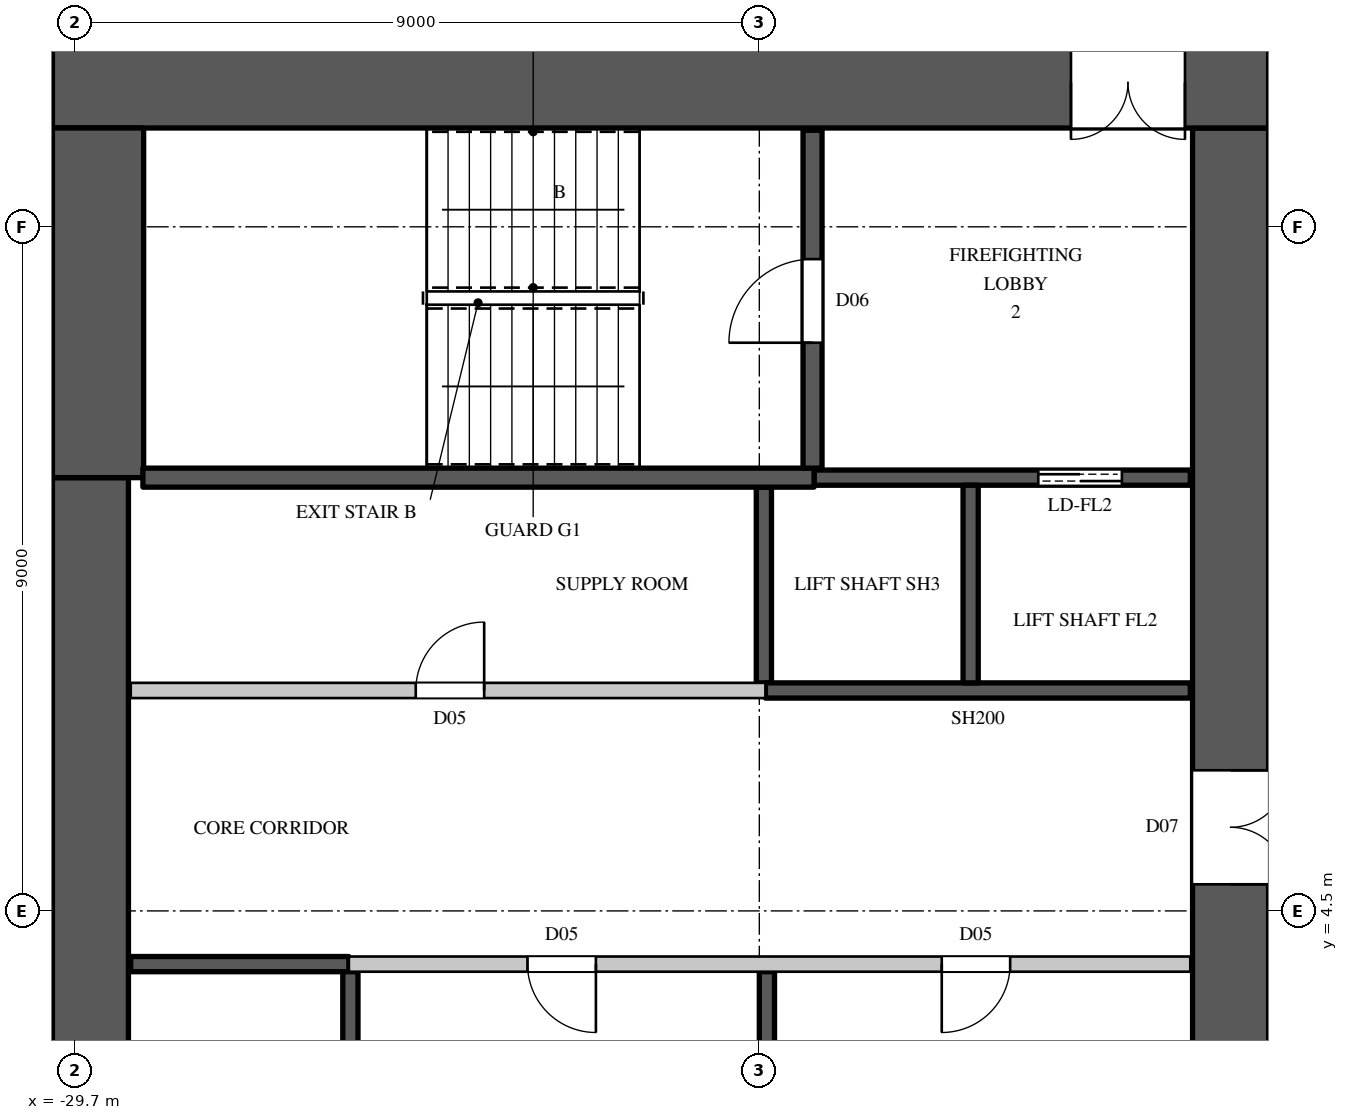
"""IFC4 building model, lengths in metres.
Left out: names, types, materials, properties, quantities, classifications, styles, units other than length and angle.
Written with IfcOpenShell. Run it as: python <this file> out.ifc"""

import sys

from ifc_helpers import new_model, si_unit, direction, frame, frame_2d, origin, place, context, subcontext, project, spatial, rectangle, extrude, element, fill, save


model = new_model("IFC4")
c1 = context("Model", 3, precision=1e-05, world=origin(), true_north=direction((0.0, 1.0)))
c2 = subcontext(c1, "Body", "Model", "MODEL_VIEW")
j1 = project(units=[si_unit("LENGTHUNIT", "METRE"), si_unit("PLANEANGLEUNIT", "RADIAN")], contexts=[c1])
p1 = place(None, origin())
s1 = spatial("IfcSite", under=j1, at=p1, CompositionType="ELEMENT")
p2 = place(p1, origin())
s2 = spatial("IfcBuilding", under=s1, at=p2, CompositionType="ELEMENT")
p3 = place(p2, frame((0.0, 0.0, 141.9)))
s3 = spatial("IfcBuildingStorey", under=s2, at=p3, CompositionType="ELEMENT", Elevation=141.9)
p4 = place(p3, frame((-30.0, 15.4, 0.0), z_axis=(0.0, 0.0, 1.0), x_axis=(1.0, 0.0, 0.0)))
e1 = element("IfcWall", 1, at=p4, inside=s3, PredefinedType="SHEAR", context=c2, shape_type="SweptSolid", body=[
    extrude(rectangle(XDim=16.0, YDim=1.2, at=frame_2d((8.0, 0.0))), origin(), (0.0, 0.0, 1.0), 3.6),
])
p5 = place(p4, frame((13.4, 0.0, 0.0)))
e2 = element("IfcOpeningElement", 2, at=p5, cuts=e1, PredefinedType="OPENING", context=c2, shape_type="SweptSolid", body=[
    extrude(rectangle(XDim=1.5, YDim=2.4, at=frame_2d((0.75, 1.2))), frame((0.0, 0.61, 0.0), z_axis=(0.0, -1.0, 0.0), x_axis=(1.0, 0.0, 0.0)), (0.0, 0.0, 1.0), 1.22),
])
p6 = place(p3, frame((-14.5, -14.8, 0.0), z_axis=(0.0, 0.0, 1.0), x_axis=(0.0, 1.0, 0.0)))
e3 = element("IfcWall", 3, at=p6, inside=s3, PredefinedType="SHEAR", context=c2, shape_type="SweptSolid", body=[
    extrude(rectangle(XDim=29.6, YDim=1.0, at=frame_2d((14.8, 0.0))), origin(), (0.0, 0.0, 1.0), 3.6),
])
p7 = place(p6, frame((8.45, 0.0, 0.0)))
e4 = element("IfcOpeningElement", 4, at=p7, cuts=e3, PredefinedType="OPENING", context=c2, shape_type="SweptSolid", body=[
    extrude(rectangle(XDim=1.5, YDim=2.4, at=frame_2d((0.75, 1.2))), frame((0.0, 0.51, 0.0), z_axis=(0.0, -1.0, 0.0), x_axis=(1.0, 0.0, 0.0)), (0.0, 0.0, 1.0), 1.02),
])
p8 = place(p6, frame((19.65, 0.0, 0.0)))
e5 = element("IfcOpeningElement", 5, at=p8, cuts=e3, PredefinedType="OPENING", context=c2, shape_type="SweptSolid", body=[
    extrude(rectangle(XDim=1.5, YDim=2.4, at=frame_2d((0.75, 1.2))), frame((0.0, 0.51, 0.0), z_axis=(0.0, -1.0, 0.0), x_axis=(1.0, 0.0, 0.0)), (0.0, 0.0, 1.0), 1.02),
])
p9 = place(p6, frame((14.5, 0.0, 0.0)))
e6 = element("IfcOpeningElement", 6, at=p9, cuts=e3, PredefinedType="OPENING", context=c2, shape_type="SweptSolid", body=[
    extrude(rectangle(XDim=0.6, YDim=2.0, at=frame_2d((0.3, 1.0))), frame((0.0, 0.51, 0.0), z_axis=(0.0, -1.0, 0.0), x_axis=(1.0, 0.0, 0.0)), (0.0, 0.0, 1.0), 1.02),
])
p10 = place(p3, frame((-29.5, -10.2, 0.0), z_axis=(0.0, 0.0, 1.0), x_axis=(0.0, 1.0, 0.0)))
e7 = element("IfcWall", 7, at=p10, inside=s3, PredefinedType="SHEAR", context=c2, shape_type="SweptSolid", body=[
    extrude(rectangle(XDim=20.4, YDim=1.0, at=frame_2d((10.2, 0.0))), origin(), (0.0, 0.0, 1.0), 3.6),
])
p11 = place(p3, frame((-29.4, 10.2, 0.0), z_axis=(0.0, 0.0, 1.0), x_axis=(0.0, 1.0, 0.0)))
e8 = element("IfcWall", 8, at=p11, inside=s3, PredefinedType="SHEAR", context=c2, shape_type="SweptSolid", body=[
    extrude(rectangle(XDim=4.6, YDim=1.2, at=frame_2d((2.3, 0.0))), origin(), (0.0, 0.0, 1.0), 3.6),
])
p12 = place(p3, frame((-28.97, 7.4, 0.0), z_axis=(0.0, 0.0, 1.0), x_axis=(1.0, 0.0, 0.0)))
e9 = element("IfcWall", 9, at=p12, inside=s3, PredefinedType="PARTITIONING", context=c2, shape_type="SweptSolid", body=[
    extrude(rectangle(XDim=8.35, YDim=0.2, at=frame_2d((4.175, 0.0))), origin(), (0.0, 0.0, 1.0), 3.3),
])
p13 = place(p12, frame((3.75, 0.0, 0.0)))
e10 = element("IfcOpeningElement", 10, at=p13, cuts=e9, PredefinedType="OPENING", context=c2, shape_type="SweptSolid", body=[
    extrude(rectangle(XDim=0.9, YDim=2.2, at=frame_2d((0.45, 1.1))), frame((0.0, 0.11, 0.0), z_axis=(0.0, -1.0, 0.0), x_axis=(1.0, 0.0, 0.0)), (0.0, 0.0, 1.0), 0.22),
])
p14 = place(p3, frame((-26.1, 3.8, 0.0), z_axis=(0.0, 0.0, 1.0), x_axis=(1.0, 0.0, 0.0)))
e11 = element("IfcWall", 11, at=p14, inside=s3, PredefinedType="PARTITIONING", context=c2, shape_type="SweptSolid", body=[
    extrude(rectangle(XDim=11.07, YDim=0.2, at=frame_2d((5.535, 0.0))), origin(), (0.0, 0.0, 1.0), 3.3),
])
p15 = place(p14, frame((2.35, 0.0, 0.0)))
e12 = element("IfcOpeningElement", 12, at=p15, cuts=e11, PredefinedType="OPENING", context=c2, shape_type="SweptSolid", body=[
    extrude(rectangle(XDim=0.9, YDim=2.2, at=frame_2d((0.45, 1.1))), frame((0.0, 0.11, 0.0), z_axis=(0.0, -1.0, 0.0), x_axis=(1.0, 0.0, 0.0)), (0.0, 0.0, 1.0), 0.22),
])
p16 = place(p14, frame((7.8, 0.0, 0.0)))
e13 = element("IfcOpeningElement", 13, at=p16, cuts=e11, PredefinedType="OPENING", context=c2, shape_type="SweptSolid", body=[
    extrude(rectangle(XDim=0.9, YDim=2.2, at=frame_2d((0.45, 1.1))), frame((0.0, 0.11, 0.0), z_axis=(0.0, -1.0, 0.0), x_axis=(1.0, 0.0, 0.0)), (0.0, 0.0, 1.0), 0.22),
])
p17 = place(p3, frame((-20.6, 1.1, 0.0), z_axis=(0.0, 0.0, 1.0), x_axis=(0.0, 1.0, 0.0)))
e14 = element("IfcWall", 14, at=p17, inside=s3, PredefinedType="SHEAR", context=c2, shape_type="SweptSolid", body=[
    extrude(rectangle(XDim=2.6, YDim=0.2, at=frame_2d((1.3, 0.0))), origin(), (0.0, 0.0, 1.0), 2.15),
])
p18 = place(p3, frame((-28.97, 3.8, 0.0), z_axis=(0.0, 0.0, 1.0), x_axis=(1.0, 0.0, 0.0)))
e15 = element("IfcWall", 15, at=p18, inside=s3, PredefinedType="SHEAR", context=c2, shape_type="SweptSolid", body=[
    extrude(rectangle(XDim=2.87, YDim=0.2, at=frame_2d((1.435, 0.0))), origin(), (0.0, 0.0, 1.0), 3.3),
])
p19 = place(p3, frame((-26.08, 1.1, 0.0), z_axis=(0.0, 0.0, 1.0), x_axis=(0.0, 1.0, 0.0)))
e16 = element("IfcWall", 16, at=p19, inside=s3, PredefinedType="SHEAR", context=c2, shape_type="SweptSolid", body=[
    extrude(rectangle(XDim=2.6, YDim=0.2, at=frame_2d((1.3, 0.0))), origin(), (0.0, 0.0, 1.0), 3.6),
])
p20 = place(p3, frame((-20.64, 7.5, 0.0), z_axis=(0.0, 0.0, 1.0), x_axis=(0.0, 1.0, 0.0)))
e17 = element("IfcWall", 17, at=p20, inside=s3, PredefinedType="SHEAR", context=c2, shape_type="SweptSolid", body=[
    extrude(rectangle(XDim=2.575, YDim=0.2, at=frame_2d((1.288, 0.0))), origin(), (0.0, 0.0, 1.0), 3.6),
])
p21 = place(p3, frame((-20.62, 7.4, 0.0), z_axis=(0.0, 0.0, 1.0), x_axis=(1.0, 0.0, 0.0)))
e18 = element("IfcWall", 18, at=p21, inside=s3, PredefinedType="SHEAR", context=c2, shape_type="SweptSolid", body=[
    extrude(rectangle(XDim=5.59, YDim=0.2, at=frame_2d((2.795, 0.0))), origin(), (0.0, 0.0, 1.0), 3.3),
])
p22 = place(p3, frame((-19.98, 10.2, 0.0), z_axis=(0.0, 0.0, 1.0), x_axis=(1.0, 0.0, 0.0)))
e19 = element("IfcWall", 19, at=p22, inside=s3, PredefinedType="SHEAR", context=c2, shape_type="SweptSolid", body=[
    extrude(rectangle(XDim=4.95, YDim=0.2, at=frame_2d((2.475, 0.0))), origin(), (0.0, 0.0, 1.0), 3.3),
])
p23 = place(p22, frame((2.95, 0.0, 0.0)))
e20 = element("IfcOpeningElement", 20, at=p23, cuts=e19, PredefinedType="OPENING", context=c2, shape_type="SweptSolid", body=[
    extrude(rectangle(XDim=1.1, YDim=2.2, at=frame_2d((0.55, 1.1))), frame((0.0, 0.11, 0.0), z_axis=(0.0, -1.0, 0.0), x_axis=(1.0, 0.0, 0.0)), (0.0, 0.0, 1.0), 0.22),
])
p24 = place(p3, frame((-17.92, 7.5, 0.0), z_axis=(0.0, 0.0, 1.0), x_axis=(0.0, 1.0, 0.0)))
e21 = element("IfcWall", 21, at=p24, inside=s3, PredefinedType="SHEAR", context=c2, shape_type="SweptSolid", body=[
    extrude(rectangle(XDim=2.6, YDim=0.2, at=frame_2d((1.3, 0.0))), origin(), (0.0, 0.0, 1.0), 3.6),
])
p25 = place(p3, frame((-28.81, 10.2, 0.0), z_axis=(0.0, 0.0, 1.0), x_axis=(1.0, 0.0, 0.0)))
e22 = element("IfcWall", 22, at=p25, inside=s3, PredefinedType="SHEAR", context=c2, shape_type="SweptSolid", body=[
    extrude(rectangle(XDim=8.83, YDim=0.25, at=frame_2d((4.415, 0.0))), origin(), (0.0, 0.0, 1.0), 3.3),
])
p26 = place(p3, frame((-20.0, 10.325, 0.0), z_axis=(0.0, 0.0, 1.0), x_axis=(0.0, 1.0, 0.0)))
e23 = element("IfcWall", 23, at=p26, inside=s3, PredefinedType="SHEAR", context=c2, shape_type="SweptSolid", body=[
    extrude(rectangle(XDim=4.445, YDim=0.25, at=frame_2d((2.223, 0.0))), origin(), (0.0, 0.0, 1.0), 3.3),
])
p27 = place(p26, frame((1.65, 0.0, 0.0)))
e24 = element("IfcOpeningElement", 24, at=p27, cuts=e23, PredefinedType="OPENING", context=c2, shape_type="SweptSolid", body=[
    extrude(rectangle(XDim=1.1, YDim=2.2, at=frame_2d((0.55, 1.1))), frame((0.0, 0.135, 0.0), z_axis=(0.0, -1.0, 0.0), x_axis=(1.0, 0.0, 0.0)), (0.0, 0.0, 1.0), 0.27),
])
p28 = place(p27, origin())
e25 = element("IfcDoor", 25, at=p28, inside=s3, OperationType="SINGLE_SWING_LEFT", PredefinedType="DOOR", context=c2, shape_type="SweptSolid", body=[
    extrude(rectangle(XDim=1.1, YDim=2.2, at=frame_2d((0.55, 1.1))), frame((0.0, 0.025, 0.0), z_axis=(0.0, -1.0, 0.0), x_axis=(1.0, 0.0, 0.0)), (0.0, 0.0, 1.0), 0.05),
])
fill(e24, e25)
p29 = place(p15, origin())
e26 = element("IfcDoor", 26, at=p29, inside=s3, OperationType="SINGLE_SWING_LEFT", PredefinedType="DOOR", context=c2, shape_type="SweptSolid", body=[
    extrude(rectangle(XDim=0.9, YDim=2.2, at=frame_2d((0.45, 1.1))), frame((0.0, 0.025, 0.0), z_axis=(0.0, -1.0, 0.0), x_axis=(1.0, 0.0, 0.0)), (0.0, 0.0, 1.0), 0.05),
])
fill(e12, e26)
p30 = place(p16, origin())
e27 = element("IfcDoor", 27, at=p30, inside=s3, OperationType="SINGLE_SWING_RIGHT", PredefinedType="DOOR", context=c2, shape_type="SweptSolid", body=[
    extrude(rectangle(XDim=0.9, YDim=2.2, at=frame_2d((0.45, 1.1))), frame((0.0, 0.025, 0.0), z_axis=(0.0, -1.0, 0.0), x_axis=(1.0, 0.0, 0.0)), (0.0, 0.0, 1.0), 0.05),
])
fill(e13, e27)
p31 = place(p13, origin())
e28 = element("IfcDoor", 28, at=p31, inside=s3, OperationType="SINGLE_SWING_RIGHT", PredefinedType="DOOR", context=c2, shape_type="SweptSolid", body=[
    extrude(rectangle(XDim=0.9, YDim=2.2, at=frame_2d((0.45, 1.1))), frame((0.0, 0.025, 0.0), z_axis=(0.0, -1.0, 0.0), x_axis=(1.0, 0.0, 0.0)), (0.0, 0.0, 1.0), 0.05),
])
fill(e10, e28)
p32 = place(p23, origin())
e29 = element("IfcDoor", 29, at=p32, inside=s3, OperationType="DOUBLE_DOOR_SLIDING", PredefinedType="DOOR", context=c2, shape_type="SweptSolid", body=[
    extrude(rectangle(XDim=1.1, YDim=2.2, at=frame_2d((0.55, 1.1))), frame((0.0, 0.025, 0.0), z_axis=(0.0, -1.0, 0.0), x_axis=(1.0, 0.0, 0.0)), (0.0, 0.0, 1.0), 0.05),
])
fill(e20, e29)
p33 = place(p5, origin())
e30 = element("IfcDoor", 30, at=p33, inside=s3, OperationType="DOUBLE_DOOR_SINGLE_SWING", PredefinedType="DOOR", context=c2, shape_type="SweptSolid", body=[
    extrude(rectangle(XDim=1.5, YDim=2.4, at=frame_2d((0.75, 1.2))), frame((0.0, 0.025, 0.0), z_axis=(0.0, -1.0, 0.0), x_axis=(1.0, 0.0, 0.0)), (0.0, 0.0, 1.0), 0.05),
])
fill(e2, e30)
p34 = place(p8, origin())
e31 = element("IfcDoor", 31, at=p34, inside=s3, OperationType="DOUBLE_DOOR_SINGLE_SWING", PredefinedType="DOOR", context=c2, shape_type="SweptSolid", body=[
    extrude(rectangle(XDim=1.5, YDim=2.4, at=frame_2d((0.75, 1.2))), frame((0.0, -0.445, 0.0), z_axis=(0.0, -1.0, 0.0), x_axis=(1.0, 0.0, 0.0)), (0.0, 0.0, 1.0), 0.05),
])
fill(e5, e31)
save(model, sys.argv[1])
